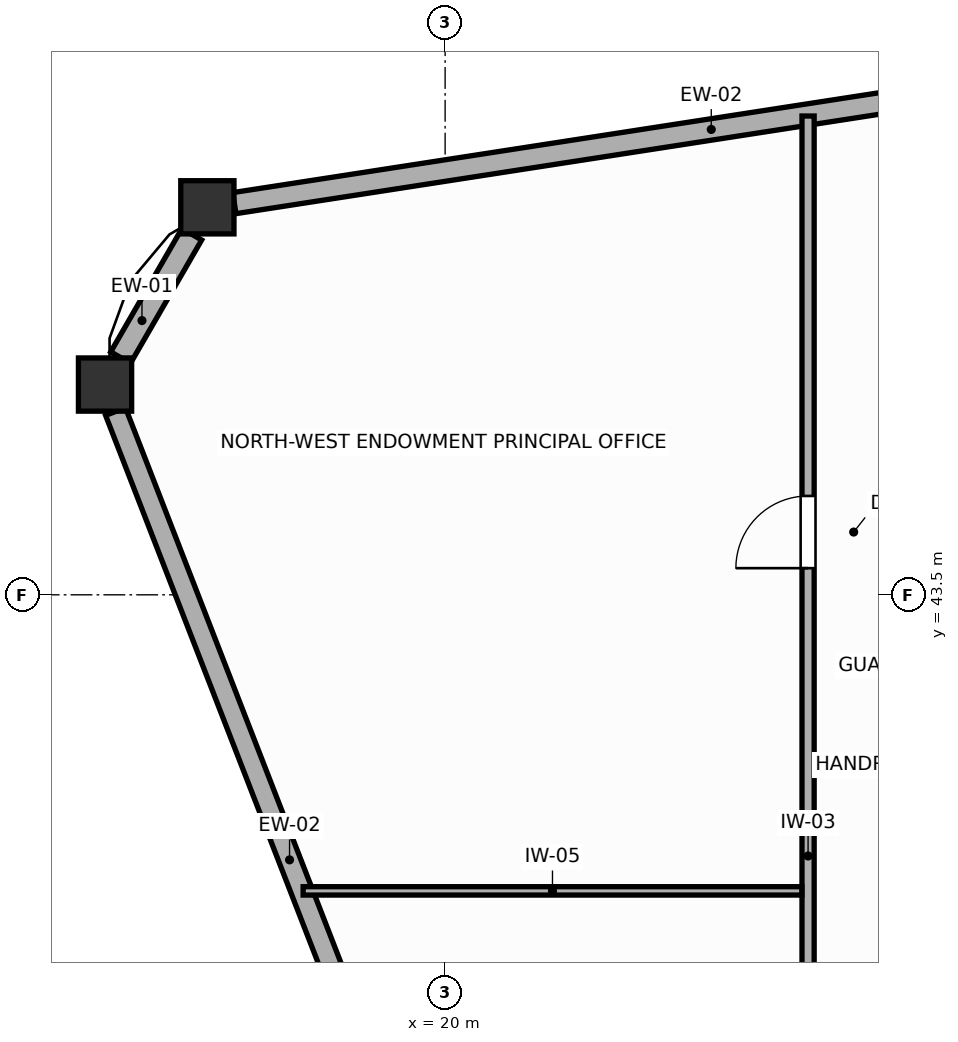
"""IFC4 building model, lengths in metres.
Left out: names, types, materials, properties, quantities, classifications, styles, units other than length and angle.
Written with IfcOpenShell. Run it as: python <this file> out.ifc"""

import sys

from ifc_helpers import new_model, si_unit, direction, frame, frame_2d, origin, origin_2d, place, context, subcontext, project, spatial, rectangle, extrude, source, transform, mapped, element, fill, save


model = new_model("IFC4")
c1 = context("Model", 3, precision=1e-05, world=origin(), true_north=direction((0.0, 1.0)))
c2 = subcontext(c1, "Body", "Model", "MODEL_VIEW")
j1 = project(units=[si_unit("LENGTHUNIT", "METRE"), si_unit("PLANEANGLEUNIT", "RADIAN")], contexts=[c1])
p1 = place(None, origin())
s1 = spatial("IfcSite", under=j1, at=p1, CompositionType="ELEMENT")
p2 = place(p1, origin())
s2 = spatial("IfcBuilding", under=s1, at=p2, CompositionType="ELEMENT")
p3 = place(p2, frame((0.0, 0.0, 264.6)))
s3 = spatial("IfcBuildingStorey", under=s2, at=p3, CompositionType="ELEMENT", Elevation=264.6)
m1 = source(origin(), c2, "Body", "SweptSolid", [
    extrude(rectangle(XDim=0.7, YDim=0.7, at=origin_2d()), origin(), (0.0, 0.0, 1.0), 3.6),
])
for number, where, z_axis, x_axis in (
    (1, (16.872, 48.598, 0.0), (0.0, 0.0, 1.0), (1.0, 0.0, 0.0)),
    (2, (15.526, 46.266, 0.0), (0.0, 0.0, 1.0), (1.0, 0.0, 0.0)),
):
    element("IfcColumn", number, at=place(p3, frame(where, z_axis=z_axis, x_axis=x_axis)), inside=s3, PredefinedType="COLUMN", context=c2, shape_type="MappedRepresentation", body=[
        mapped(m1, transform((0.0, 0.0, 0.0), scale=1.0)),
    ])
p4 = place(p3, frame((29.775, 50.592, 0.0), z_axis=(0.0, 0.0, 1.0), x_axis=(-0.988271454673, -0.152707340617, 0.0)))
e3 = element("IfcWall", 3, at=p4, inside=s3, PredefinedType="SOLIDWALL", context=c2, shape_type="SweptSolid", body=[
    extrude(rectangle(XDim=12.697, YDim=0.28, at=frame_2d((6.349, 0.0))), origin(), (0.0, 0.0, 1.0), 3.08),
])
p5 = place(p3, frame((16.667, 48.243, 0.0), z_axis=(0.0, 0.0, 1.0), x_axis=(-0.500023421257, -0.866011881093, 0.0)))
e4 = element("IfcWall", 4, at=p5, inside=s3, PredefinedType="SOLIDWALL", context=c2, shape_type="SweptSolid", body=[
    extrude(rectangle(XDim=1.873, YDim=0.3, at=frame_2d((0.936, 0.0))), origin(), (0.0, 0.0, 1.0), 3.08),
])
p6 = place(p3, frame((15.664, 45.911, 0.0), z_axis=(0.0, 0.0, 1.0), x_axis=(0.3618810561, -0.932224276253, 0.0)))
e5 = element("IfcWall", 5, at=p6, inside=s3, PredefinedType="SOLIDWALL", context=c2, shape_type="SweptSolid", body=[
    extrude(rectangle(XDim=12.654, YDim=0.28, at=frame_2d((6.327, 0.0))), origin(), (0.0, 0.0, 1.0), 3.05),
])
p7 = place(p3, frame((24.775, 32.31, 0.0), z_axis=(0.0, 0.0, 1.0), x_axis=(0.0, 1.0, 0.0)))
e6 = element("IfcWall", 6, at=p7, inside=s3, PredefinedType="PARTITIONING", context=c2, shape_type="SweptSolid", body=[
    extrude(rectangle(XDim=17.489, YDim=0.16, at=frame_2d((8.745, 0.0))), origin(), (0.0, 0.0, 1.0), 3.41),
])
p8 = place(p7, frame((3.018, 0.0, 0.0)))
e7 = element("IfcOpeningElement", 7, at=p8, cuts=e6, PredefinedType="OPENING", context=c2, shape_type="SweptSolid", body=[
    extrude(rectangle(XDim=0.95, YDim=2.05, at=frame_2d((0.475, 1.025))), frame((0.0, 0.09, 0.0), z_axis=(0.0, -1.0, 0.0), x_axis=(1.0, 0.0, 0.0)), (0.0, 0.0, 1.0), 0.18),
])
p9 = place(p7, frame((11.541, 0.0, 0.0)))
e8 = element("IfcOpeningElement", 8, at=p9, cuts=e6, PredefinedType="OPENING", context=c2, shape_type="SweptSolid", body=[
    extrude(rectangle(XDim=0.95, YDim=2.05, at=frame_2d((0.475, 1.025))), frame((0.0, 0.09, 0.0), z_axis=(0.0, -1.0, 0.0), x_axis=(1.0, 0.0, 0.0)), (0.0, 0.0, 1.0), 0.18),
])
p10 = place(p3, frame((18.132, 39.605, 0.0), z_axis=(0.0, 0.0, 1.0), x_axis=(1.0, 0.0, 0.0)))
e9 = element("IfcWall", 9, at=p10, inside=s3, PredefinedType="MOVABLE", context=c2, shape_type="SweptSolid", body=[
    extrude(rectangle(XDim=6.562, YDim=0.11, at=frame_2d((3.281, 0.0))), origin(), (0.0, 0.0, 1.0), 3.41),
])
p11 = place(p9, origin())
e10 = element("IfcDoor", 10, at=p11, inside=s3, OperationType="SINGLE_SWING_LEFT", PredefinedType="DOOR", context=c2, shape_type="SweptSolid", body=[
    extrude(rectangle(XDim=0.95, YDim=2.05, at=frame_2d((0.475, 1.025))), frame((0.0, 0.025, 0.0), z_axis=(0.0, -1.0, 0.0), x_axis=(1.0, 0.0, 0.0)), (0.0, 0.0, 1.0), 0.05),
])
fill(e8, e10)
save(model, sys.argv[1])
